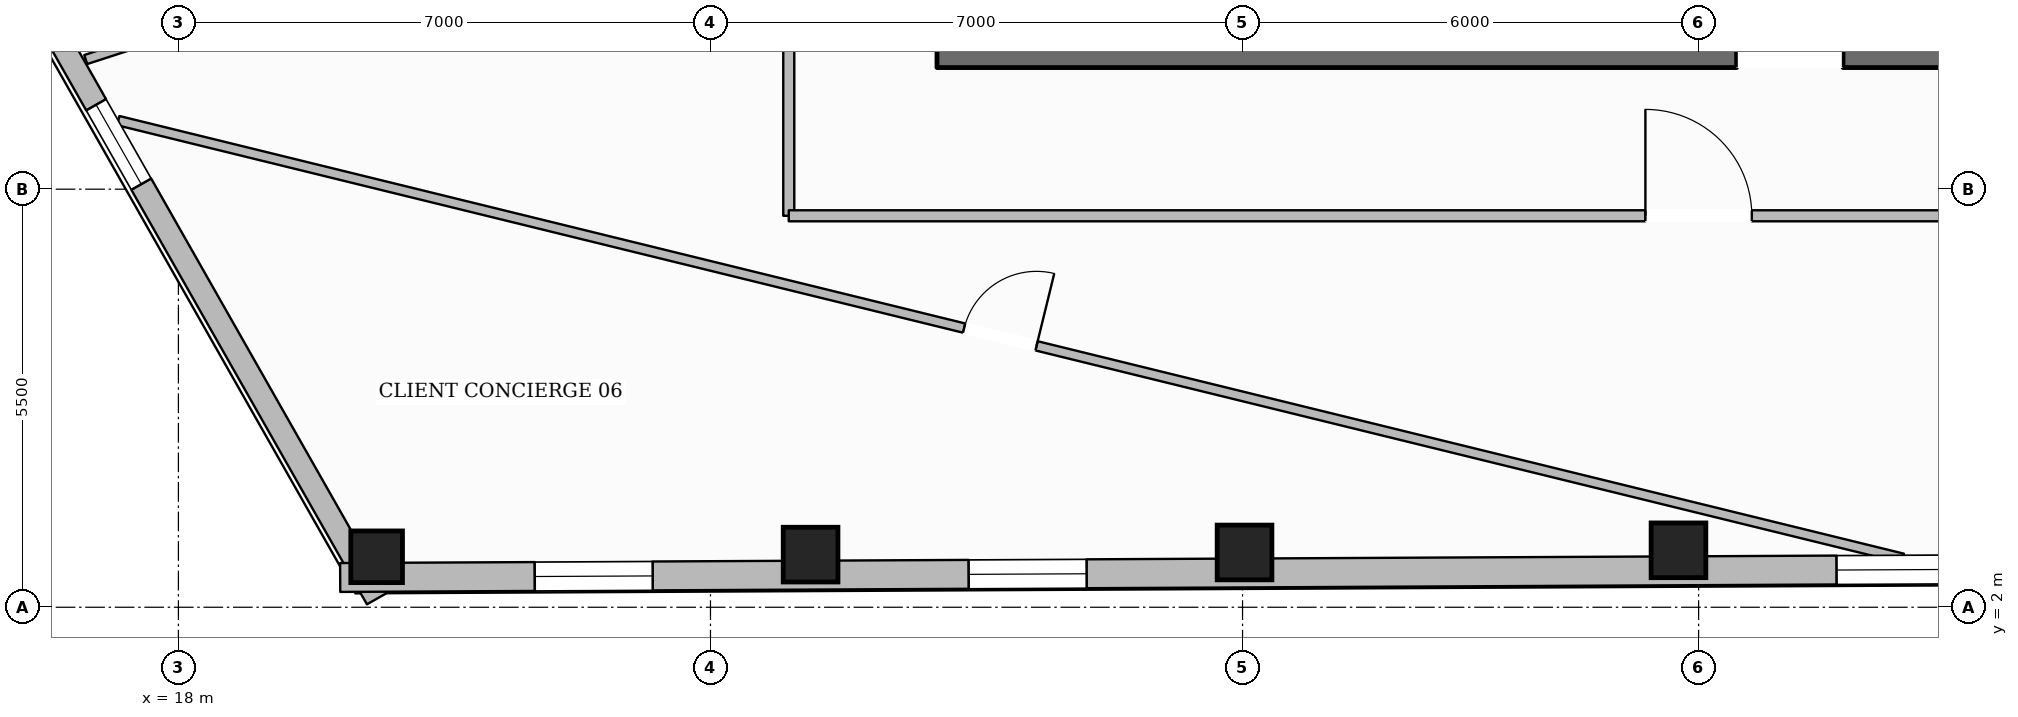
"""IFC4 building model, lengths in metres.
Left out: names, types, materials, properties, quantities, classifications, styles, units other than length and angle.
Written with IfcOpenShell. Run it as: python <this file> out.ifc"""

import sys

from ifc_helpers import new_model, si_unit, direction, frame, frame_2d, origin, origin_2d, place, context, subcontext, project, spatial, rectangle, hollow_rectangle, extrude, element, fill, save


model = new_model("IFC4")
c1 = context("Model", 3, precision=1e-05, world=origin(), true_north=direction((0.0, 1.0)))
c2 = subcontext(c1, "Body", "Model", "MODEL_VIEW")
j1 = project(units=[si_unit("LENGTHUNIT", "METRE"), si_unit("PLANEANGLEUNIT", "RADIAN")], contexts=[c1])
p1 = place(None, origin())
s1 = spatial("IfcSite", under=j1, at=p1, CompositionType="ELEMENT")
p2 = place(p1, origin())
s2 = spatial("IfcBuilding", under=s1, at=p2, CompositionType="ELEMENT")
p3 = place(p2, frame((0.0, 0.0, 85.5)))
s3 = spatial("IfcBuildingStorey", under=s2, at=p3, CompositionType="ELEMENT", Elevation=85.5)
p4 = place(p3, frame((27.98, 9.35, 0.0), z_axis=(0.0, 0.0, 1.0), x_axis=(1.0, 0.0, 0.0)))
e1 = element("IfcWall", 1, at=p4, inside=s3, PredefinedType="SOLIDWALL", context=c2, shape_type="SweptSolid", body=[
    extrude(rectangle(XDim=20.04, YDim=0.5, at=frame_2d((10.02, 0.0))), origin(), (0.0, 0.0, 1.0), 3.6),
])
p5 = place(p4, frame((10.52, 0.0, 0.0)))
e2 = element("IfcOpeningElement", 2, at=p5, cuts=e1, PredefinedType="OPENING", context=c2, shape_type="SweptSolid", body=[
    extrude(rectangle(XDim=1.4, YDim=2.2, at=frame_2d((0.7, 1.1))), frame((0.0, 0.26, 0.0), z_axis=(0.0, -1.0, 0.0), x_axis=(1.0, 0.0, 0.0)), (0.0, 0.0, 1.0), 0.52),
])
p6 = place(p3, frame((20.608, 2.664, 0.0), z_axis=(0.0, 0.0, 1.0), x_axis=(1.0, 0.0, 0.0)))
e3 = element("IfcColumn", 3, at=p6, inside=s3, PredefinedType="COLUMN", context=c2, shape_type="SweptSolid", body=[
    extrude(hollow_rectangle(XDim=0.68, YDim=0.68, WallThickness=0.03, at=origin_2d()), origin(), (0.0, 0.0, 1.0), 3.6),
])
for number, where, z_axis, x_axis in (
    (4, (26.317, 2.692, 0.0), (0.0, 0.0, 1.0), (1.0, 0.0, 0.0)),
    (5, (32.026, 2.721, 0.0), (0.0, 0.0, 1.0), (1.0, 0.0, 0.0)),
    (6, (37.735, 2.749, 0.0), (0.0, 0.0, 1.0), (1.0, 0.0, 0.0)),
):
    element("IfcColumn", number, at=place(p3, frame(where, z_axis=z_axis, x_axis=x_axis)), inside=s3, PredefinedType="COLUMN", context=c2, shape_type="SweptSolid", body=[
        extrude(hollow_rectangle(XDim=0.72, YDim=0.72, WallThickness=0.032, at=origin_2d()), origin(), (0.0, 0.0, 1.0), 3.6),
    ])
p7 = place(p3, frame((20.611, 2.112, 0.0), z_axis=(0.0, 0.0, 1.0), x_axis=(-0.494112228191, 0.869398128565, 0.0)))
e7 = element("IfcWall", 7, at=p7, inside=s3, PredefinedType="STANDARD", context=c2, shape_type="SweptSolid", body=[
    extrude(rectangle(XDim=13.747, YDim=0.3, at=frame_2d((6.874, 0.0))), origin(), (0.0, 0.0, 1.0), 3.059),
])
p8 = place(p7, frame((6.274, 0.0, 0.65)))
e8 = element("IfcOpeningElement", 8, at=p8, cuts=e7, PredefinedType="OPENING", context=c2, shape_type="SweptSolid", body=[
    extrude(rectangle(XDim=1.2, YDim=1.7, at=frame_2d((0.6, 0.85))), frame((0.0, 0.16, 0.0), z_axis=(0.0, -1.0, 0.0), x_axis=(1.0, 0.0, 0.0)), (0.0, 0.0, 1.0), 0.32),
])
p9 = place(p3, frame((55.34, 2.567, 0.0), z_axis=(0.0, 0.0, 1.0), x_axis=(-0.999987608505, -0.00497823626, 0.0)))
e9 = element("IfcWall", 9, at=p9, inside=s3, PredefinedType="STANDARD", context=c2, shape_type="SweptSolid", body=[
    extrude(rectangle(XDim=35.212, YDim=0.38, at=frame_2d((17.606, 0.0))), origin(), (0.0, 0.0, 1.0), 3.059),
])
p10 = place(p9, frame((31.102, 0.0, 0.65)))
e10 = element("IfcOpeningElement", 10, at=p10, cuts=e9, PredefinedType="OPENING", context=c2, shape_type="SweptSolid", body=[
    extrude(rectangle(XDim=1.55, YDim=1.75, at=frame_2d((0.775, 0.875))), frame((0.0, 0.2, 0.0), z_axis=(0.0, -1.0, 0.0), x_axis=(1.0, 0.0, 0.0)), (0.0, 0.0, 1.0), 0.4),
])
p11 = place(p9, frame((25.392, 0.0, 0.65)))
e11 = element("IfcOpeningElement", 11, at=p11, cuts=e9, PredefinedType="OPENING", context=c2, shape_type="SweptSolid", body=[
    extrude(rectangle(XDim=1.55, YDim=1.75, at=frame_2d((0.775, 0.875))), frame((0.0, 0.2, 0.0), z_axis=(0.0, -1.0, 0.0), x_axis=(1.0, 0.0, 0.0)), (0.0, 0.0, 1.0), 0.4),
])
p12 = place(p9, frame((13.974, 0.0, 0.65)))
e12 = element("IfcOpeningElement", 12, at=p12, cuts=e9, PredefinedType="OPENING", context=c2, shape_type="SweptSolid", body=[
    extrude(rectangle(XDim=1.55, YDim=1.75, at=frame_2d((0.775, 0.875))), frame((0.0, 0.2, 0.0), z_axis=(0.0, -1.0, 0.0), x_axis=(1.0, 0.0, 0.0)), (0.0, 0.0, 1.0), 0.4),
])
p13 = place(p9, frame((8.265, 0.0, 0.65)))
e13 = element("IfcOpeningElement", 13, at=p13, cuts=e9, PredefinedType="OPENING", context=c2, shape_type="SweptSolid", body=[
    extrude(rectangle(XDim=1.55, YDim=1.75, at=frame_2d((0.775, 0.875))), frame((0.0, 0.2, 0.0), z_axis=(0.0, -1.0, 0.0), x_axis=(1.0, 0.0, 0.0)), (0.0, 0.0, 1.0), 0.4),
])
p14 = place(p9, frame((2.556, 0.0, 0.65)))
e14 = element("IfcOpeningElement", 14, at=p14, cuts=e9, PredefinedType="OPENING", context=c2, shape_type="SweptSolid", body=[
    extrude(rectangle(XDim=1.55, YDim=1.75, at=frame_2d((0.775, 0.875))), frame((0.0, 0.2, 0.0), z_axis=(0.0, -1.0, 0.0), x_axis=(1.0, 0.0, 0.0)), (0.0, 0.0, 1.0), 0.4),
])
p15 = place(p3, frame((26.03, 25.05, 0.0), z_axis=(0.0, 0.0, 1.0), x_axis=(0.0, -1.0, 0.0)))
e15 = element("IfcWall", 15, at=p15, inside=s3, PredefinedType="PARTITIONING", context=c2, shape_type="SweptSolid", body=[
    extrude(rectangle(XDim=17.9, YDim=0.145, at=frame_2d((8.95, 0.0))), origin(), (0.0, 0.0, 1.0), 3.288),
])
p16 = place(p15, frame((4.717, 0.0, 0.0)))
e16 = element("IfcOpeningElement", 16, at=p16, cuts=e15, PredefinedType="OPENING", context=c2, shape_type="SweptSolid", body=[
    extrude(rectangle(XDim=1.4, YDim=2.2, at=frame_2d((0.7, 1.1))), frame((0.0, 0.083, 0.0), z_axis=(0.0, -1.0, 0.0), x_axis=(1.0, 0.0, 0.0)), (0.0, 0.0, 1.0), 0.165),
])
p17 = place(p3, frame((26.03, 7.15, 0.0), z_axis=(0.0, 0.0, 1.0), x_axis=(1.0, 0.0, 0.0)))
e17 = element("IfcWall", 17, at=p17, inside=s3, PredefinedType="PARTITIONING", context=c2, shape_type="SweptSolid", body=[
    extrude(rectangle(XDim=23.94, YDim=0.145, at=frame_2d((11.97, 0.0))), origin(), (0.0, 0.0, 1.0), 3.6),
])
p18 = place(p17, frame((11.27, 0.0, 0.0)))
e18 = element("IfcOpeningElement", 18, at=p18, cuts=e17, PredefinedType="OPENING", context=c2, shape_type="SweptSolid", body=[
    extrude(rectangle(XDim=1.4, YDim=2.2, at=frame_2d((0.7, 1.1))), frame((0.0, 0.083, 0.0), z_axis=(0.0, -1.0, 0.0), x_axis=(1.0, 0.0, 0.0)), (0.0, 0.0, 1.0), 0.165),
])
p19 = place(p3, frame((25.949, 12.185, 0.0), z_axis=(0.0, 0.0, 1.0), x_axis=(-0.951059189605, -0.309008766651, 0.0)))
e19 = element("IfcWall", 19, at=p19, inside=s3, PredefinedType="PARTITIONING", context=c2, shape_type="SweptSolid", body=[
    extrude(rectangle(XDim=9.641, YDim=0.125, at=frame_2d((4.82, 0.0))), origin(), (0.0, 0.0, 1.0), 3.6),
])
p20 = place(p3, frame((17.208, 8.402, 0.0), z_axis=(0.0, 0.0, 1.0), x_axis=(0.971215252653, -0.238203553741, 0.0)))
e20 = element("IfcWall", 20, at=p20, inside=s3, PredefinedType="PARTITIONING", context=c2, shape_type="SweptSolid", body=[
    extrude(rectangle(XDim=24.174, YDim=0.125, at=frame_2d((12.087, 0.0))), origin(), (0.0, 0.0, 1.0), 3.062),
])
p21 = place(p20, frame((11.459, 0.0, 0.0)))
e21 = element("IfcOpeningElement", 21, at=p21, cuts=e20, PredefinedType="OPENING", context=c2, shape_type="SweptSolid", body=[
    extrude(rectangle(XDim=0.98, YDim=2.15, at=frame_2d((0.49, 1.075))), frame((0.0, 0.073, 0.0), z_axis=(0.0, -1.0, 0.0), x_axis=(1.0, 0.0, 0.0)), (0.0, 0.0, 1.0), 0.145),
])
p22 = place(p10, origin())
e22 = element("IfcWindow", 22, at=p22, inside=s3, PartitioningType="SINGLE_PANEL", PredefinedType="WINDOW", context=c2, shape_type="SweptSolid", body=[
    extrude(rectangle(XDim=1.55, YDim=1.75, at=frame_2d((0.775, 0.875))), frame((0.0, 0.03, 0.0), z_axis=(0.0, -1.0, 0.0), x_axis=(1.0, 0.0, 0.0)), (0.0, 0.0, 1.0), 0.06),
])
fill(e10, e22)
p23 = place(p11, origin())
e23 = element("IfcWindow", 23, at=p23, inside=s3, PartitioningType="SINGLE_PANEL", PredefinedType="WINDOW", context=c2, shape_type="SweptSolid", body=[
    extrude(rectangle(XDim=1.55, YDim=1.75, at=frame_2d((0.775, 0.875))), frame((0.0, 0.03, 0.0), z_axis=(0.0, -1.0, 0.0), x_axis=(1.0, 0.0, 0.0)), (0.0, 0.0, 1.0), 0.06),
])
fill(e11, e23)
p24 = place(p12, origin())
e24 = element("IfcWindow", 24, at=p24, inside=s3, PartitioningType="SINGLE_PANEL", PredefinedType="WINDOW", context=c2, shape_type="SweptSolid", body=[
    extrude(rectangle(XDim=1.55, YDim=1.75, at=frame_2d((0.775, 0.875))), frame((0.0, 0.03, 0.0), z_axis=(0.0, -1.0, 0.0), x_axis=(1.0, 0.0, 0.0)), (0.0, 0.0, 1.0), 0.06),
])
fill(e12, e24)
p25 = place(p8, origin())
e25 = element("IfcWindow", 25, at=p25, inside=s3, PartitioningType="SINGLE_PANEL", PredefinedType="WINDOW", context=c2, shape_type="SweptSolid", body=[
    extrude(rectangle(XDim=1.2, YDim=1.7, at=frame_2d((0.6, 0.85))), frame((0.0, 0.03, 0.0), z_axis=(0.0, -1.0, 0.0), x_axis=(1.0, 0.0, 0.0)), (0.0, 0.0, 1.0), 0.06),
])
fill(e8, e25)
p26 = place(p18, origin())
e26 = element("IfcDoor", 26, at=p26, inside=s3, OperationType="SINGLE_SWING_LEFT", PredefinedType="DOOR", context=c2, shape_type="SweptSolid", body=[
    extrude(rectangle(XDim=1.4, YDim=2.2, at=frame_2d((0.7, 1.1))), frame((0.0, 0.025, 0.0), z_axis=(0.0, -1.0, 0.0), x_axis=(1.0, 0.0, 0.0)), (0.0, 0.0, 1.0), 0.05),
])
fill(e18, e26)
p27 = place(p21, origin())
e27 = element("IfcDoor", 27, at=p27, inside=s3, OperationType="SINGLE_SWING_RIGHT", PredefinedType="DOOR", context=c2, shape_type="SweptSolid", body=[
    extrude(rectangle(XDim=0.98, YDim=2.15, at=frame_2d((0.49, 1.075))), frame((0.0, 0.025, 0.0), z_axis=(0.0, -1.0, 0.0), x_axis=(1.0, 0.0, 0.0)), (0.0, 0.0, 1.0), 0.05),
])
fill(e21, e27)
save(model, sys.argv[1])
